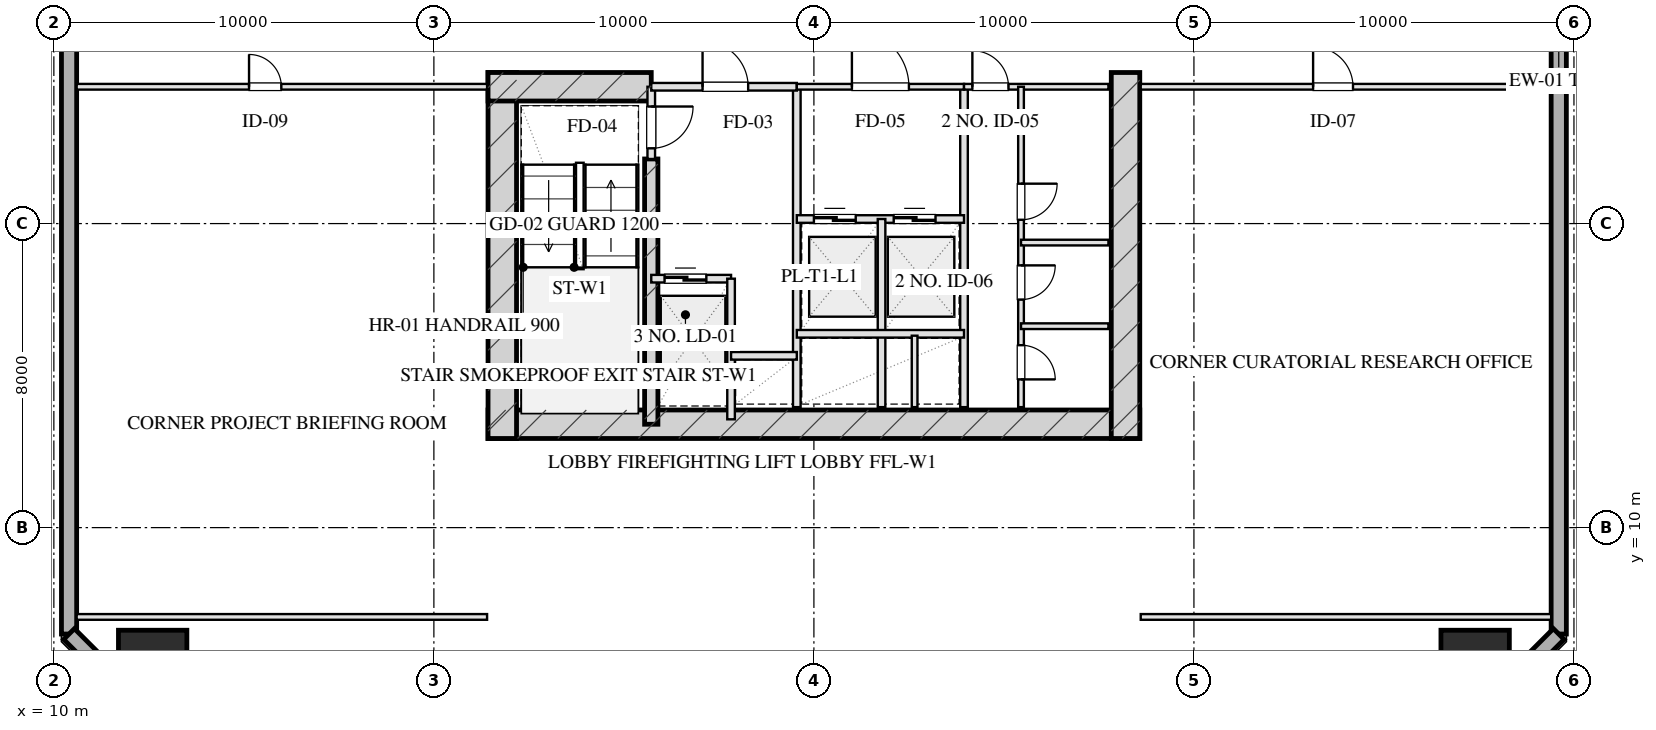
"""IFC4 building model, lengths in metres.
Left out: names, types, materials, properties, quantities, classifications, styles, units other than length and angle.
Written with IfcOpenShell. Run it as: python <this file> out.ifc"""

import sys

from ifc_helpers import new_model, si_unit, direction, frame, frame_2d, origin, origin_2d, place, context, subcontext, project, spatial, rectangle, hollow_rectangle, extrude, element, fill, save


model = new_model("IFC4")
c1 = context("Model", 3, precision=1e-05, world=origin(), true_north=direction((0.0, 1.0)))
c2 = subcontext(c1, "Body", "Model", "MODEL_VIEW")
j1 = project(units=[si_unit("LENGTHUNIT", "METRE"), si_unit("PLANEANGLEUNIT", "RADIAN")], contexts=[c1])
p1 = place(None, origin())
s1 = spatial("IfcSite", under=j1, at=p1, CompositionType="ELEMENT")
p2 = place(p1, origin())
s2 = spatial("IfcBuilding", under=s1, at=p2, CompositionType="ELEMENT")
p3 = place(p2, frame((0.0, 0.0, 50.6)))
s3 = spatial("IfcBuildingStorey", under=s2, at=p3, CompositionType="ELEMENT", Elevation=50.6)
p4 = place(p3, frame((21.425, 12.72, 0.0), z_axis=(0.0, 0.0, 1.0), x_axis=(1.0, 0.0, 0.0)))
e1 = element("IfcWall", 1, at=p4, inside=s3, PredefinedType="SHEAR", context=c2, shape_type="SweptSolid", body=[
    extrude(rectangle(XDim=17.15, YDim=0.75, at=frame_2d((8.575, 0.0))), origin(), (0.0, 0.0, 1.0), 3.45),
])
for number, where, z_axis, x_axis in (
    (2, (21.8, 21.975, 0.0), (0.0, 0.0, 1.0), (0.0, -1.0, 0.0)),
    (3, (38.2, 21.975, 0.0), (0.0, 0.0, 1.0), (0.0, -1.0, 0.0)),
):
    element("IfcWall", number, at=place(p3, frame(where, z_axis=z_axis, x_axis=x_axis)), inside=s3, PredefinedType="SHEAR", context=c2, shape_type="SweptSolid", body=[
        extrude(rectangle(XDim=9.63, YDim=0.75, at=frame_2d((4.815, 0.0))), origin(), (0.0, 0.0, 1.0), 3.45),
    ])
p5 = place(p3, frame((25.72, 19.7, 0.0), z_axis=(0.0, 0.0, 1.0), x_axis=(0.0, -1.0, 0.0)))
e4 = element("IfcWall", 4, at=p5, inside=s3, PredefinedType="SHEAR", context=c2, shape_type="SweptSolid", body=[
    extrude(rectangle(XDim=6.98, YDim=0.35, at=frame_2d((3.49, 0.0))), origin(), (0.0, 0.0, 1.0), 3.45),
])
p6 = place(p3, frame((21.425, 21.6, 0.0), z_axis=(0.0, 0.0, 1.0), x_axis=(1.0, 0.0, 0.0)))
e5 = element("IfcWall", 5, at=p6, inside=s3, PredefinedType="SHEAR", context=c2, shape_type="SweptSolid", body=[
    extrude(rectangle(XDim=4.295, YDim=0.75, at=frame_2d((2.147, 0.0))), origin(), (0.0, 0.0, 1.0), 3.45),
])
for number, where, z_axis, x_axis in (
    (6, (12.6, 6.4, 0.0), (0.0, 0.0, 1.0), (1.0, 0.0, 0.0)),
    (7, (47.4, 6.4, 0.0), (0.0, 0.0, 1.0), (1.0, 0.0, 0.0)),
):
    element("IfcColumn", number, at=place(p3, frame(where, z_axis=z_axis, x_axis=x_axis)), inside=s3, PredefinedType="COLUMN", context=c2, shape_type="SweptSolid", body=[
        extrude(hollow_rectangle(XDim=1.8, YDim=1.8, WallThickness=0.06, at=origin_2d()), origin(), (0.0, 0.0, 1.0), 3.451),
    ])
p7 = place(p3, frame((10.4, 7.2, 0.0), z_axis=(0.0, 0.0, 1.0), x_axis=(0.0, 1.0, 0.0)))
e8 = element("IfcWall", 8, at=p7, inside=s3, PredefinedType="SOLIDWALL", context=c2, shape_type="SweptSolid", body=[
    extrude(rectangle(XDim=53.6, YDim=0.4, at=frame_2d((26.8, 0.0))), origin(), (0.0, 0.0, 1.0), 2.61),
])
p8 = place(p7, frame((29.35, 0.0, 0.0)))
e9 = element("IfcOpeningElement", 9, at=p8, cuts=e8, PredefinedType="OPENING", context=c2, shape_type="SweptSolid", body=[
    extrude(rectangle(XDim=1.1, YDim=2.15, at=frame_2d((0.55, 1.075))), frame((0.0, 0.21, 0.0), z_axis=(0.0, -1.0, 0.0), x_axis=(1.0, 0.0, 0.0)), (0.0, 0.0, 1.0), 0.42),
])
p9 = place(p3, frame((49.6, 60.8, 0.0), z_axis=(0.0, 0.0, 1.0), x_axis=(0.0, -1.0, 0.0)))
e10 = element("IfcWall", 10, at=p9, inside=s3, PredefinedType="SOLIDWALL", context=c2, shape_type="SweptSolid", body=[
    extrude(rectangle(XDim=53.6, YDim=0.4, at=frame_2d((26.8, 0.0))), origin(), (0.0, 0.0, 1.0), 2.61),
])
p10 = place(p9, frame((31.95, 0.0, 0.75)))
e11 = element("IfcOpeningElement", 11, at=p10, cuts=e10, PredefinedType="OPENING", context=c2, shape_type="SweptSolid", body=[
    extrude(rectangle(XDim=2.5, YDim=1.46, at=frame_2d((1.25, 0.73))), frame((0.0, 0.21, 0.0), z_axis=(0.0, -1.0, 0.0), x_axis=(1.0, 0.0, 0.0)), (0.0, 0.0, 1.0), 0.42),
])
p11 = place(p9, frame((20.45, 0.0, 0.0)))
e12 = element("IfcOpeningElement", 12, at=p11, cuts=e10, PredefinedType="OPENING", context=c2, shape_type="SweptSolid", body=[
    extrude(rectangle(XDim=1.1, YDim=2.15, at=frame_2d((0.55, 1.075))), frame((0.0, 0.21, 0.0), z_axis=(0.0, -1.0, 0.0), x_axis=(1.0, 0.0, 0.0)), (0.0, 0.0, 1.0), 0.42),
])
for number, where, z_axis, x_axis in (
    (13, (49.6, 7.2, 0.0), (0.0, 0.0, 1.0), (-0.707, -0.707, 0.0)),
    (14, (13.4, 4.2, 0.0), (0.0, 0.0, 1.0), (-0.707, 0.707, 0.0)),
):
    element("IfcWall", number, at=place(p3, frame(where, z_axis=z_axis, x_axis=x_axis)), inside=s3, PredefinedType="SOLIDWALL", context=c2, shape_type="SweptSolid", body=[
        extrude(rectangle(XDim=4.243, YDim=0.4, at=frame_2d((2.121, 0.0))), origin(), (0.0, 0.0, 1.0), 2.61),
    ])
p12 = place(p3, frame((25.72, 21.6, 0.0), z_axis=(0.0, 0.0, 1.0), x_axis=(0.0, -1.0, 0.0)))
e15 = element("IfcWall", 15, at=p12, inside=s3, PredefinedType="PARTITIONING", context=c2, shape_type="SweptSolid", body=[
    extrude(rectangle(XDim=1.9, YDim=0.2, at=frame_2d((0.95, 0.0))), origin(), (0.0, 0.0, 1.0), 3.175),
])
p13 = place(p12, frame((0.52, 0.0, 0.0)))
e16 = element("IfcOpeningElement", 16, at=p13, cuts=e15, PredefinedType="OPENING", context=c2, shape_type="SweptSolid", body=[
    extrude(rectangle(XDim=1.1, YDim=2.05, at=frame_2d((0.55, 1.025))), frame((0.0, 0.11, 0.0), z_axis=(0.0, -1.0, 0.0), x_axis=(1.0, 0.0, 0.0)), (0.0, 0.0, 1.0), 0.22),
])
p14 = place(p3, frame((29.55, 21.6, 0.0), z_axis=(0.0, 0.0, 1.0), x_axis=(0.0, -1.0, 0.0)))
e17 = element("IfcWall", 17, at=p14, inside=s3, PredefinedType="PARTITIONING", context=c2, shape_type="SweptSolid", body=[
    extrude(rectangle(XDim=8.43, YDim=0.2, at=frame_2d((4.215, 0.0))), origin(), (0.0, 0.0, 1.0), 3.175),
])
p15 = place(p3, frame((25.72, 21.6, 0.0), z_axis=(0.0, 0.0, 1.0), x_axis=(1.0, 0.0, 0.0)))
e18 = element("IfcWall", 18, at=p15, inside=s3, PredefinedType="PARTITIONING", context=c2, shape_type="SweptSolid", body=[
    extrude(rectangle(XDim=3.83, YDim=0.2, at=frame_2d((1.915, 0.0))), origin(), (0.0, 0.0, 1.0), 3.175),
])
p16 = place(p15, frame((1.35, 0.0, 0.0)))
e19 = element("IfcOpeningElement", 19, at=p16, cuts=e18, PredefinedType="OPENING", context=c2, shape_type="SweptSolid", body=[
    extrude(rectangle(XDim=1.2, YDim=2.05, at=frame_2d((0.6, 1.025))), frame((0.0, 0.11, 0.0), z_axis=(0.0, -1.0, 0.0), x_axis=(1.0, 0.0, 0.0)), (0.0, 0.0, 1.0), 0.22),
])
p17 = place(p3, frame((25.72, 16.55, 0.0), z_axis=(0.0, 0.0, 1.0), x_axis=(1.0, 0.0, 0.0)))
e20 = element("IfcWall", 20, at=p17, inside=s3, PredefinedType="PARTITIONING", context=c2, shape_type="SweptSolid", body=[
    extrude(rectangle(XDim=2.1, YDim=0.2, at=frame_2d((1.05, 0.0))), origin(), (0.0, 0.0, 1.0), 3.175),
])
p18 = place(p17, frame((0.35, 0.0, 0.0)))
e21 = element("IfcOpeningElement", 21, at=p18, cuts=e20, PredefinedType="OPENING", context=c2, shape_type="SweptSolid", body=[
    extrude(rectangle(XDim=1.1, YDim=2.05, at=frame_2d((0.55, 1.025))), frame((0.0, 0.11, 0.0), z_axis=(0.0, -1.0, 0.0), x_axis=(1.0, 0.0, 0.0)), (0.0, 0.0, 1.0), 0.22),
])
p19 = place(p3, frame((27.82, 16.55, 0.0), z_axis=(0.0, 0.0, 1.0), x_axis=(0.0, -1.0, 0.0)))
e22 = element("IfcWall", 22, at=p19, inside=s3, PredefinedType="PARTITIONING", context=c2, shape_type="SweptSolid", body=[
    extrude(rectangle(XDim=3.7, YDim=0.2, at=frame_2d((1.85, 0.0))), origin(), (0.0, 0.0, 1.0), 3.175),
])
p20 = place(p3, frame((27.82, 14.52, 0.0), z_axis=(0.0, 0.0, 1.0), x_axis=(1.0, 0.0, 0.0)))
e23 = element("IfcWall", 23, at=p20, inside=s3, PredefinedType="PARTITIONING", context=c2, shape_type="SweptSolid", body=[
    extrude(rectangle(XDim=1.73, YDim=0.2, at=frame_2d((0.865, 0.0))), origin(), (0.0, 0.0, 1.0), 3.175),
])
p21 = place(p3, frame((33.95, 21.6, 0.0), z_axis=(0.0, 0.0, 1.0), x_axis=(0.0, -1.0, 0.0)))
e24 = element("IfcWall", 24, at=p21, inside=s3, PredefinedType="PARTITIONING", context=c2, shape_type="SweptSolid", body=[
    extrude(rectangle(XDim=8.43, YDim=0.2, at=frame_2d((4.215, 0.0))), origin(), (0.0, 0.0, 1.0), 3.175),
])
p22 = place(p3, frame((29.55, 21.6, 0.0), z_axis=(0.0, 0.0, 1.0), x_axis=(1.0, 0.0, 0.0)))
e25 = element("IfcWall", 25, at=p22, inside=s3, PredefinedType="PARTITIONING", context=c2, shape_type="SweptSolid", body=[
    extrude(rectangle(XDim=4.4, YDim=0.15, at=frame_2d((2.2, 0.0))), origin(), (0.0, 0.0, 1.0), 3.175),
])
p23 = place(p22, frame((1.45, 0.0, 0.0)))
e26 = element("IfcOpeningElement", 26, at=p23, cuts=e25, PredefinedType="OPENING", context=c2, shape_type="SweptSolid", body=[
    extrude(rectangle(XDim=1.5, YDim=2.05, at=frame_2d((0.75, 1.025))), frame((0.0, 0.085, 0.0), z_axis=(0.0, -1.0, 0.0), x_axis=(1.0, 0.0, 0.0)), (0.0, 0.0, 1.0), 0.17),
])
p24 = place(p3, frame((29.55, 18.12, 0.0), z_axis=(0.0, 0.0, 1.0), x_axis=(1.0, 0.0, 0.0)))
e27 = element("IfcWall", 27, at=p24, inside=s3, PredefinedType="PARTITIONING", context=c2, shape_type="SweptSolid", body=[
    extrude(rectangle(XDim=4.4, YDim=0.2, at=frame_2d((2.2, 0.0))), origin(), (0.0, 0.0, 1.0), 3.175),
])
p25 = place(p24, frame((0.45, 0.0, 0.0)))
e28 = element("IfcOpeningElement", 28, at=p25, cuts=e27, PredefinedType="OPENING", context=c2, shape_type="SweptSolid", body=[
    extrude(rectangle(XDim=1.1, YDim=2.05, at=frame_2d((0.55, 1.025))), frame((0.0, 0.11, 0.0), z_axis=(0.0, -1.0, 0.0), x_axis=(1.0, 0.0, 0.0)), (0.0, 0.0, 1.0), 0.22),
])
p26 = place(p24, frame((2.55, 0.0, 0.0)))
e29 = element("IfcOpeningElement", 29, at=p26, cuts=e27, PredefinedType="OPENING", context=c2, shape_type="SweptSolid", body=[
    extrude(rectangle(XDim=1.1, YDim=2.05, at=frame_2d((0.55, 1.025))), frame((0.0, 0.11, 0.0), z_axis=(0.0, -1.0, 0.0), x_axis=(1.0, 0.0, 0.0)), (0.0, 0.0, 1.0), 0.22),
])
p27 = place(p3, frame((31.78, 18.12, 0.0), z_axis=(0.0, 0.0, 1.0), x_axis=(0.0, -1.0, 0.0)))
e30 = element("IfcWall", 30, at=p27, inside=s3, PredefinedType="PARTITIONING", context=c2, shape_type="SweptSolid", body=[
    extrude(rectangle(XDim=4.95, YDim=0.2, at=frame_2d((2.475, 0.0))), origin(), (0.0, 0.0, 1.0), 3.175),
])
p28 = place(p3, frame((29.55, 15.1, 0.0), z_axis=(0.0, 0.0, 1.0), x_axis=(1.0, 0.0, 0.0)))
e31 = element("IfcWall", 31, at=p28, inside=s3, PredefinedType="PARTITIONING", context=c2, shape_type="SweptSolid", body=[
    extrude(rectangle(XDim=4.4, YDim=0.2, at=frame_2d((2.2, 0.0))), origin(), (0.0, 0.0, 1.0), 3.175),
])
p29 = place(p3, frame((32.65, 15.05, 0.0), z_axis=(0.0, 0.0, 1.0), x_axis=(0.0, -1.0, 0.0)))
e32 = element("IfcWall", 32, at=p29, inside=s3, PredefinedType="PARTITIONING", context=c2, shape_type="SweptSolid", body=[
    extrude(rectangle(XDim=1.88, YDim=0.15, at=frame_2d((0.94, 0.0))), origin(), (0.0, 0.0, 1.0), 3.175),
])
p30 = place(p3, frame((33.95, 21.6, 0.0), z_axis=(0.0, 0.0, 1.0), x_axis=(1.0, 0.0, 0.0)))
e33 = element("IfcWall", 33, at=p30, inside=s3, PredefinedType="PARTITIONING", context=c2, shape_type="SweptSolid", body=[
    extrude(rectangle(XDim=3.8, YDim=0.15, at=frame_2d((1.9, 0.0))), origin(), (0.0, 0.0, 1.0), 3.175),
])
p31 = place(p30, frame((0.22, 0.0, 0.0)))
e34 = element("IfcOpeningElement", 34, at=p31, cuts=e33, PredefinedType="OPENING", context=c2, shape_type="SweptSolid", body=[
    extrude(rectangle(XDim=0.95, YDim=2.05, at=frame_2d((0.475, 1.025))), frame((0.0, 0.085, 0.0), z_axis=(0.0, -1.0, 0.0), x_axis=(1.0, 0.0, 0.0)), (0.0, 0.0, 1.0), 0.17),
])
p32 = place(p3, frame((35.45, 21.6, 0.0), z_axis=(0.0, 0.0, 1.0), x_axis=(0.0, -1.0, 0.0)))
e35 = element("IfcWall", 35, at=p32, inside=s3, PredefinedType="PARTITIONING", context=c2, shape_type="SweptSolid", body=[
    extrude(rectangle(XDim=8.43, YDim=0.15, at=frame_2d((4.215, 0.0))), origin(), (0.0, 0.0, 1.0), 2.815),
])
p33 = place(p32, frame((2.55, 0.0, 0.0)))
e36 = element("IfcOpeningElement", 36, at=p33, cuts=e35, PredefinedType="OPENING", context=c2, shape_type="SweptSolid", body=[
    extrude(rectangle(XDim=0.95, YDim=2.05, at=frame_2d((0.475, 1.025))), frame((0.0, 0.085, 0.0), z_axis=(0.0, -1.0, 0.0), x_axis=(1.0, 0.0, 0.0)), (0.0, 0.0, 1.0), 0.17),
])
p34 = place(p32, frame((4.7, 0.0, 0.0)))
e37 = element("IfcOpeningElement", 37, at=p34, cuts=e35, PredefinedType="OPENING", context=c2, shape_type="SweptSolid", body=[
    extrude(rectangle(XDim=0.9, YDim=2.05, at=frame_2d((0.45, 1.025))), frame((0.0, 0.085, 0.0), z_axis=(0.0, -1.0, 0.0), x_axis=(1.0, 0.0, 0.0)), (0.0, 0.0, 1.0), 0.17),
])
p35 = place(p32, frame((6.8, 0.0, 0.0)))
e38 = element("IfcOpeningElement", 38, at=p35, cuts=e35, PredefinedType="OPENING", context=c2, shape_type="SweptSolid", body=[
    extrude(rectangle(XDim=0.9, YDim=2.05, at=frame_2d((0.45, 1.025))), frame((0.0, 0.085, 0.0), z_axis=(0.0, -1.0, 0.0), x_axis=(1.0, 0.0, 0.0)), (0.0, 0.0, 1.0), 0.17),
])
for number, where, z_axis, x_axis in (
    (39, (35.45, 17.5, 0.0), (0.0, 0.0, 1.0), (1.0, 0.0, 0.0)),
    (40, (35.45, 15.3, 0.0), (0.0, 0.0, 1.0), (1.0, 0.0, 0.0)),
):
    element("IfcWall", number, at=place(p3, frame(where, z_axis=z_axis, x_axis=x_axis)), inside=s3, PredefinedType="PARTITIONING", context=c2, shape_type="SweptSolid", body=[
        extrude(rectangle(XDim=2.3, YDim=0.15, at=frame_2d((1.15, 0.0))), origin(), (0.0, 0.0, 1.0), 3.175),
    ])
p36 = place(p3, frame((10.6, 7.65, 0.0), z_axis=(0.0, 0.0, 1.0), x_axis=(1.0, 0.0, 0.0)))
e41 = element("IfcWall", 41, at=p36, inside=s3, PredefinedType="PARTITIONING", context=c2, shape_type="SweptSolid", body=[
    extrude(rectangle(XDim=10.8, YDim=0.15, at=frame_2d((5.4, 0.0))), origin(), (0.0, 0.0, 1.0), 3.175),
])
p37 = place(p3, frame((10.6, 21.6, 0.0), z_axis=(0.0, 0.0, 1.0), x_axis=(1.0, 0.0, 0.0)))
e42 = element("IfcWall", 42, at=p37, inside=s3, PredefinedType="PARTITIONING", context=c2, shape_type="SweptSolid", body=[
    extrude(rectangle(XDim=10.8, YDim=0.15, at=frame_2d((5.4, 0.0))), origin(), (0.0, 0.0, 1.0), 3.175),
])
p38 = place(p37, frame((4.536, 0.0, 0.0)))
e43 = element("IfcOpeningElement", 43, at=p38, cuts=e42, PredefinedType="OPENING", context=c2, shape_type="SweptSolid", body=[
    extrude(rectangle(XDim=0.85, YDim=2.05, at=frame_2d((0.425, 1.025))), frame((0.0, 0.085, 0.0), z_axis=(0.0, -1.0, 0.0), x_axis=(1.0, 0.0, 0.0)), (0.0, 0.0, 1.0), 0.17),
])
p39 = place(p3, frame((38.6, 7.65, 0.0), z_axis=(0.0, 0.0, 1.0), x_axis=(1.0, 0.0, 0.0)))
e44 = element("IfcWall", 44, at=p39, inside=s3, PredefinedType="PARTITIONING", context=c2, shape_type="SweptSolid", body=[
    extrude(rectangle(XDim=10.8, YDim=0.15, at=frame_2d((5.4, 0.0))), origin(), (0.0, 0.0, 1.0), 3.175),
])
p40 = place(p3, frame((38.6, 21.6, 0.0), z_axis=(0.0, 0.0, 1.0), x_axis=(1.0, 0.0, 0.0)))
e45 = element("IfcWall", 45, at=p40, inside=s3, PredefinedType="PARTITIONING", context=c2, shape_type="SweptSolid", body=[
    extrude(rectangle(XDim=10.8, YDim=0.15, at=frame_2d((5.4, 0.0))), origin(), (0.0, 0.0, 1.0), 3.175),
])
p41 = place(p40, frame((4.536, 0.0, 0.0)))
e46 = element("IfcOpeningElement", 46, at=p41, cuts=e45, PredefinedType="OPENING", context=c2, shape_type="SweptSolid", body=[
    extrude(rectangle(XDim=1.05, YDim=2.05, at=frame_2d((0.525, 1.025))), frame((0.0, 0.085, 0.0), z_axis=(0.0, -1.0, 0.0), x_axis=(1.0, 0.0, 0.0)), (0.0, 0.0, 1.0), 0.17),
])
p42 = place(p13, origin())
e47 = element("IfcDoor", 47, at=p42, inside=s3, OperationType="SINGLE_SWING_LEFT", PredefinedType="DOOR", context=c2, shape_type="SweptSolid", body=[
    extrude(rectangle(XDim=1.1, YDim=2.05, at=frame_2d((0.55, 1.025))), frame((0.0, 0.025, 0.0), z_axis=(0.0, -1.0, 0.0), x_axis=(1.0, 0.0, 0.0)), (0.0, 0.0, 1.0), 0.05),
])
fill(e16, e47)
p43 = place(p16, origin())
e48 = element("IfcDoor", 48, at=p43, inside=s3, OperationType="SINGLE_SWING_LEFT", PredefinedType="DOOR", context=c2, shape_type="SweptSolid", body=[
    extrude(rectangle(XDim=1.2, YDim=2.05, at=frame_2d((0.6, 1.025))), frame((0.0, 0.025, 0.0), z_axis=(0.0, -1.0, 0.0), x_axis=(1.0, 0.0, 0.0)), (0.0, 0.0, 1.0), 0.05),
])
fill(e19, e48)
p44 = place(p18, origin())
e49 = element("IfcDoor", 49, at=p44, inside=s3, OperationType="DOUBLE_DOOR_SLIDING", PredefinedType="DOOR", context=c2, shape_type="SweptSolid", body=[
    extrude(rectangle(XDim=1.1, YDim=2.05, at=frame_2d((0.55, 1.025))), frame((0.0, 0.025, 0.0), z_axis=(0.0, -1.0, 0.0), x_axis=(1.0, 0.0, 0.0)), (0.0, 0.0, 1.0), 0.05),
])
fill(e21, e49)
p45 = place(p23, origin())
e50 = element("IfcDoor", 50, at=p45, inside=s3, OperationType="SINGLE_SWING_LEFT", PredefinedType="DOOR", context=c2, shape_type="SweptSolid", body=[
    extrude(rectangle(XDim=1.5, YDim=2.05, at=frame_2d((0.75, 1.025))), frame((0.0, 0.025, 0.0), z_axis=(0.0, -1.0, 0.0), x_axis=(1.0, 0.0, 0.0)), (0.0, 0.0, 1.0), 0.05),
])
fill(e26, e50)
p46 = place(p25, origin())
e51 = element("IfcDoor", 51, at=p46, inside=s3, OperationType="DOUBLE_DOOR_SLIDING", PredefinedType="DOOR", context=c2, shape_type="SweptSolid", body=[
    extrude(rectangle(XDim=1.1, YDim=2.05, at=frame_2d((0.55, 1.025))), frame((0.0, 0.025, 0.0), z_axis=(0.0, -1.0, 0.0), x_axis=(1.0, 0.0, 0.0)), (0.0, 0.0, 1.0), 0.05),
])
fill(e28, e51)
p47 = place(p26, origin())
e52 = element("IfcDoor", 52, at=p47, inside=s3, OperationType="DOUBLE_DOOR_SLIDING", PredefinedType="DOOR", context=c2, shape_type="SweptSolid", body=[
    extrude(rectangle(XDim=1.1, YDim=2.05, at=frame_2d((0.55, 1.025))), frame((0.0, 0.025, 0.0), z_axis=(0.0, -1.0, 0.0), x_axis=(1.0, 0.0, 0.0)), (0.0, 0.0, 1.0), 0.05),
])
fill(e29, e52)
p48 = place(p31, origin())
e53 = element("IfcDoor", 53, at=p48, inside=s3, OperationType="SINGLE_SWING_LEFT", PredefinedType="DOOR", context=c2, shape_type="SweptSolid", body=[
    extrude(rectangle(XDim=0.95, YDim=2.05, at=frame_2d((0.475, 1.025))), frame((0.0, 0.025, 0.0), z_axis=(0.0, -1.0, 0.0), x_axis=(1.0, 0.0, 0.0)), (0.0, 0.0, 1.0), 0.05),
])
fill(e34, e53)
p49 = place(p33, origin())
e54 = element("IfcDoor", 54, at=p49, inside=s3, OperationType="SINGLE_SWING_LEFT", PredefinedType="DOOR", context=c2, shape_type="SweptSolid", body=[
    extrude(rectangle(XDim=0.95, YDim=2.05, at=frame_2d((0.475, 1.025))), frame((0.0, 0.025, 0.0), z_axis=(0.0, -1.0, 0.0), x_axis=(1.0, 0.0, 0.0)), (0.0, 0.0, 1.0), 0.05),
])
fill(e36, e54)
p50 = place(p34, origin())
e55 = element("IfcDoor", 55, at=p50, inside=s3, OperationType="SINGLE_SWING_LEFT", PredefinedType="DOOR", context=c2, shape_type="SweptSolid", body=[
    extrude(rectangle(XDim=0.9, YDim=2.05, at=frame_2d((0.45, 1.025))), frame((0.0, 0.025, 0.0), z_axis=(0.0, -1.0, 0.0), x_axis=(1.0, 0.0, 0.0)), (0.0, 0.0, 1.0), 0.05),
])
fill(e37, e55)
p51 = place(p35, origin())
e56 = element("IfcDoor", 56, at=p51, inside=s3, OperationType="SINGLE_SWING_RIGHT", PredefinedType="DOOR", context=c2, shape_type="SweptSolid", body=[
    extrude(rectangle(XDim=0.9, YDim=2.05, at=frame_2d((0.45, 1.025))), frame((0.0, 0.025, 0.0), z_axis=(0.0, -1.0, 0.0), x_axis=(1.0, 0.0, 0.0)), (0.0, 0.0, 1.0), 0.05),
])
fill(e38, e56)
p52 = place(p38, origin())
e57 = element("IfcDoor", 57, at=p52, inside=s3, OperationType="SINGLE_SWING_LEFT", PredefinedType="DOOR", context=c2, shape_type="SweptSolid", body=[
    extrude(rectangle(XDim=0.85, YDim=2.05, at=frame_2d((0.425, 1.025))), frame((0.0, 0.025, 0.0), z_axis=(0.0, -1.0, 0.0), x_axis=(1.0, 0.0, 0.0)), (0.0, 0.0, 1.0), 0.05),
])
fill(e43, e57)
p53 = place(p41, origin())
e58 = element("IfcDoor", 58, at=p53, inside=s3, OperationType="SINGLE_SWING_LEFT", PredefinedType="DOOR", context=c2, shape_type="SweptSolid", body=[
    extrude(rectangle(XDim=1.05, YDim=2.05, at=frame_2d((0.525, 1.025))), frame((0.0, 0.025, 0.0), z_axis=(0.0, -1.0, 0.0), x_axis=(1.0, 0.0, 0.0)), (0.0, 0.0, 1.0), 0.05),
])
fill(e46, e58)
save(model, sys.argv[1])
